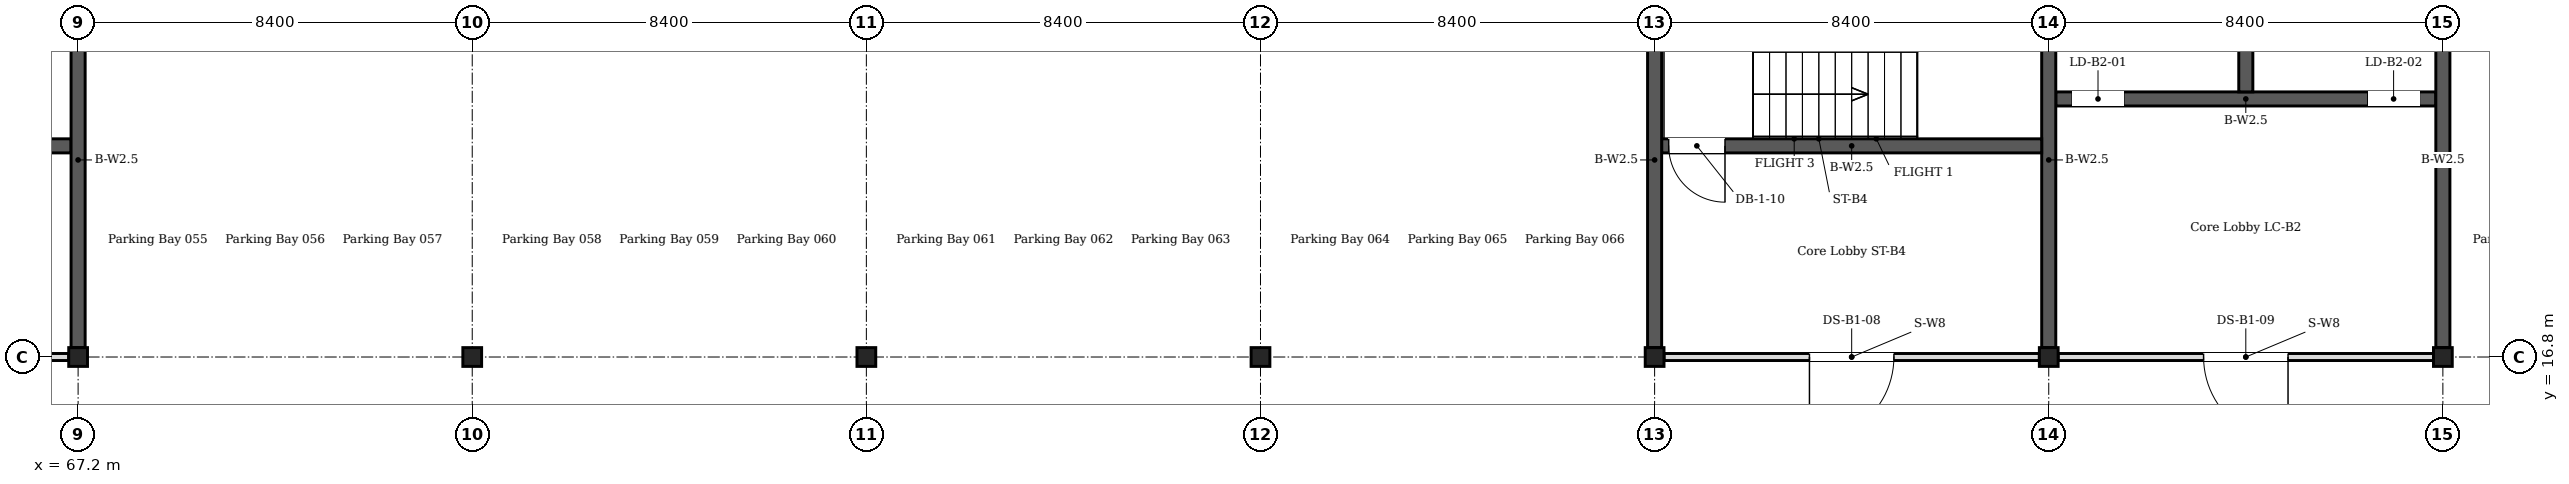
"""IFC4 building model, lengths in metres.
Left out: names, types, materials, properties, quantities, classifications, styles, units other than length and angle.
Written with IfcOpenShell. Run it as: python <this file> out.ifc"""

import sys

from ifc_helpers import new_model, si_unit, direction, frame, frame_2d, origin, origin_2d, place, context, subcontext, project, spatial, rectangle, i_section, extrude, element, fill, save


model = new_model("IFC4")
c1 = context("Model", 3, precision=1e-05, world=origin(), true_north=direction((0.0, 1.0)))
c2 = subcontext(c1, "Body", "Model", "MODEL_VIEW")
j1 = project(units=[si_unit("LENGTHUNIT", "METRE"), si_unit("PLANEANGLEUNIT", "RADIAN")], contexts=[c1])
p1 = place(None, origin())
s1 = spatial("IfcSite", under=j1, at=p1, CompositionType="ELEMENT")
p2 = place(p1, origin())
s2 = spatial("IfcBuilding", under=s1, at=p2, CompositionType="ELEMENT")
p3 = place(p2, frame((0.0, 0.0, -5.4)))
s3 = spatial("IfcBuildingStorey", under=s2, at=p3, CompositionType="ELEMENT", Elevation=-5.4)
for number, where, z_axis, x_axis in (
    (1, (67.2, 16.8, 0.0), (0.0, 0.0, 1.0), (1.0, 0.0, 0.0)),
    (2, (75.6, 16.8, 0.0), (0.0, 0.0, 1.0), (1.0, 0.0, 0.0)),
    (3, (84.0, 16.8, 0.0), (0.0, 0.0, 1.0), (1.0, 0.0, 0.0)),
    (4, (92.4, 16.8, 0.0), (0.0, 0.0, 1.0), (1.0, 0.0, 0.0)),
    (5, (100.8, 16.8, 0.0), (0.0, 0.0, 1.0), (1.0, 0.0, 0.0)),
    (6, (109.2, 16.8, 0.0), (0.0, 0.0, 1.0), (1.0, 0.0, 0.0)),
    (7, (117.6, 16.8, 0.0), (0.0, 0.0, 1.0), (1.0, 0.0, 0.0)),
):
    element("IfcColumn", number, at=place(p3, frame(where, z_axis=z_axis, x_axis=x_axis)), inside=s3, PredefinedType="COLUMN", context=c2, shape_type="SweptSolid", body=[
        extrude(i_section(OverallWidth=0.4, OverallDepth=0.4, WebThickness=0.013, FlangeThickness=0.021, FilletRadius=0.022, at=origin_2d()), origin(), (0.0, 0.0, 1.0), 5.4),
    ])
for number, where, z_axis, x_axis in (
    (8, (109.2, 17.0, 0.0), (0.0, 0.0, 1.0), (0.0, 1.0, 0.0)),
    (9, (117.6, 17.0, 0.0), (0.0, 0.0, 1.0), (0.0, 1.0, 0.0)),
):
    element("IfcWall", number, at=place(p3, frame(where, z_axis=z_axis, x_axis=x_axis)), inside=s3, PredefinedType="SHEAR", context=c2, shape_type="SweptSolid", body=[
        extrude(rectangle(XDim=8.0, YDim=0.3, at=frame_2d((4.0, 0.0))), origin(), (0.0, 0.0, 1.0), 4.95),
    ])
p4 = place(p3, frame((109.35, 22.3, 0.0), z_axis=(0.0, 0.0, 1.0), x_axis=(1.0, 0.0, 0.0)))
e10 = element("IfcWall", 10, at=p4, inside=s3, PredefinedType="SHEAR", context=c2, shape_type="SweptSolid", body=[
    extrude(rectangle(XDim=8.1, YDim=0.3, at=frame_2d((4.05, 0.0))), origin(), (0.0, 0.0, 1.0), 4.95),
])
p5 = place(p4, frame((0.35, 0.0, 0.0)))
e11 = element("IfcOpeningElement", 11, at=p5, cuts=e10, PredefinedType="OPENING", context=c2, shape_type="SweptSolid", body=[
    extrude(rectangle(XDim=1.1, YDim=2.2, at=frame_2d((0.55, 1.1))), frame((0.0, 0.16, 0.0), z_axis=(0.0, -1.0, 0.0), x_axis=(1.0, 0.0, 0.0)), (0.0, 0.0, 1.0), 0.32),
])
p6 = place(p4, frame((6.65, 0.0, 0.0)))
e12 = element("IfcOpeningElement", 12, at=p6, cuts=e10, PredefinedType="OPENING", context=c2, shape_type="SweptSolid", body=[
    extrude(rectangle(XDim=1.1, YDim=2.2, at=frame_2d((0.55, 1.1))), frame((0.0, 0.16, 0.0), z_axis=(0.0, -1.0, 0.0), x_axis=(1.0, 0.0, 0.0)), (0.0, 0.0, 1.0), 0.32),
])
p7 = place(p3, frame((113.4, 22.45, 0.0), z_axis=(0.0, 0.0, 1.0), x_axis=(0.0, 1.0, 0.0)))
e13 = element("IfcWall", 13, at=p7, inside=s3, PredefinedType="SHEAR", context=c2, shape_type="SweptSolid", body=[
    extrude(rectangle(XDim=2.95, YDim=0.3, at=frame_2d((1.475, 0.0))), origin(), (0.0, 0.0, 1.0), 4.95),
])
p8 = place(p3, frame((67.2, 17.0, 0.0), z_axis=(0.0, 0.0, 1.0), x_axis=(0.0, 1.0, 0.0)))
e14 = element("IfcWall", 14, at=p8, inside=s3, PredefinedType="SHEAR", context=c2, shape_type="SweptSolid", body=[
    extrude(rectangle(XDim=8.0, YDim=0.3, at=frame_2d((4.0, 0.0))), origin(), (0.0, 0.0, 1.0), 4.95),
])
p9 = place(p3, frame((58.95, 21.3, 0.0), z_axis=(0.0, 0.0, 1.0), x_axis=(1.0, 0.0, 0.0)))
e15 = element("IfcWall", 15, at=p9, inside=s3, PredefinedType="SHEAR", context=c2, shape_type="SweptSolid", body=[
    extrude(rectangle(XDim=8.1, YDim=0.3, at=frame_2d((4.05, 0.0))), origin(), (0.0, 0.0, 1.0), 4.95),
])
p10 = place(p9, frame((0.15, 0.0, 0.0)))
e16 = element("IfcOpeningElement", 16, at=p10, cuts=e15, PredefinedType="OPENING", context=c2, shape_type="SweptSolid", body=[
    extrude(rectangle(XDim=1.2, YDim=2.1, at=frame_2d((0.6, 1.05))), frame((0.0, 0.16, 0.0), z_axis=(0.0, -1.0, 0.0), x_axis=(1.0, 0.0, 0.0)), (0.0, 0.0, 1.0), 0.32),
])
p11 = place(p3, frame((100.8, 17.0, 0.0), z_axis=(0.0, 0.0, 1.0), x_axis=(0.0, 1.0, 0.0)))
e17 = element("IfcWall", 17, at=p11, inside=s3, PredefinedType="SHEAR", context=c2, shape_type="SweptSolid", body=[
    extrude(rectangle(XDim=8.0, YDim=0.3, at=frame_2d((4.0, 0.0))), origin(), (0.0, 0.0, 1.0), 4.95),
])
p12 = place(p3, frame((100.95, 21.3, 0.0), z_axis=(0.0, 0.0, 1.0), x_axis=(1.0, 0.0, 0.0)))
e18 = element("IfcWall", 18, at=p12, inside=s3, PredefinedType="SHEAR", context=c2, shape_type="SweptSolid", body=[
    extrude(rectangle(XDim=8.1, YDim=0.3, at=frame_2d((4.05, 0.0))), origin(), (0.0, 0.0, 1.0), 4.95),
])
p13 = place(p12, frame((0.15, 0.0, 0.0)))
e19 = element("IfcOpeningElement", 19, at=p13, cuts=e18, PredefinedType="OPENING", context=c2, shape_type="SweptSolid", body=[
    extrude(rectangle(XDim=1.2, YDim=2.1, at=frame_2d((0.6, 1.05))), frame((0.0, 0.16, 0.0), z_axis=(0.0, -1.0, 0.0), x_axis=(1.0, 0.0, 0.0)), (0.0, 0.0, 1.0), 0.32),
])
p14 = place(p3, frame((59.0, 16.8, 0.0), z_axis=(0.0, 0.0, 1.0), x_axis=(1.0, 0.0, 0.0)))
e20 = element("IfcWall", 20, at=p14, inside=s3, PredefinedType="PARTITIONING", context=c2, shape_type="SweptSolid", body=[
    extrude(rectangle(XDim=8.0, YDim=0.15, at=frame_2d((4.0, 0.0))), origin(), (0.0, 0.0, 1.0), 4.95),
])
p15 = place(p14, frame((3.1, 0.0, 0.0)))
e21 = element("IfcOpeningElement", 21, at=p15, cuts=e20, PredefinedType="OPENING", context=c2, shape_type="SweptSolid", body=[
    extrude(rectangle(XDim=1.8, YDim=2.1, at=frame_2d((0.9, 1.05))), frame((0.0, 0.085, 0.0), z_axis=(0.0, -1.0, 0.0), x_axis=(1.0, 0.0, 0.0)), (0.0, 0.0, 1.0), 0.17),
])
p16 = place(p3, frame((101.0, 16.8, 0.0), z_axis=(0.0, 0.0, 1.0), x_axis=(1.0, 0.0, 0.0)))
e22 = element("IfcWall", 22, at=p16, inside=s3, PredefinedType="PARTITIONING", context=c2, shape_type="SweptSolid", body=[
    extrude(rectangle(XDim=8.0, YDim=0.15, at=frame_2d((4.0, 0.0))), origin(), (0.0, 0.0, 1.0), 4.95),
])
p17 = place(p16, frame((3.1, 0.0, 0.0)))
e23 = element("IfcOpeningElement", 23, at=p17, cuts=e22, PredefinedType="OPENING", context=c2, shape_type="SweptSolid", body=[
    extrude(rectangle(XDim=1.8, YDim=2.1, at=frame_2d((0.9, 1.05))), frame((0.0, 0.085, 0.0), z_axis=(0.0, -1.0, 0.0), x_axis=(1.0, 0.0, 0.0)), (0.0, 0.0, 1.0), 0.17),
])
p18 = place(p3, frame((109.4, 16.8, 0.0), z_axis=(0.0, 0.0, 1.0), x_axis=(1.0, 0.0, 0.0)))
e24 = element("IfcWall", 24, at=p18, inside=s3, PredefinedType="PARTITIONING", context=c2, shape_type="SweptSolid", body=[
    extrude(rectangle(XDim=8.0, YDim=0.15, at=frame_2d((4.0, 0.0))), origin(), (0.0, 0.0, 1.0), 4.95),
])
p19 = place(p18, frame((3.1, 0.0, 0.0)))
e25 = element("IfcOpeningElement", 25, at=p19, cuts=e24, PredefinedType="OPENING", context=c2, shape_type="SweptSolid", body=[
    extrude(rectangle(XDim=1.8, YDim=2.1, at=frame_2d((0.9, 1.05))), frame((0.0, 0.085, 0.0), z_axis=(0.0, -1.0, 0.0), x_axis=(1.0, 0.0, 0.0)), (0.0, 0.0, 1.0), 0.17),
])
p20 = place(p17, origin())
e26 = element("IfcDoor", 26, at=p20, inside=s3, OperationType="DOUBLE_DOOR_SINGLE_SWING", PredefinedType="DOOR", context=c2, shape_type="SweptSolid", body=[
    extrude(rectangle(XDim=1.8, YDim=2.1, at=frame_2d((0.9, 1.05))), frame((0.0, 0.025, 0.0), z_axis=(0.0, -1.0, 0.0), x_axis=(1.0, 0.0, 0.0)), (0.0, 0.0, 1.0), 0.05),
])
fill(e23, e26)
p21 = place(p19, origin())
e27 = element("IfcDoor", 27, at=p21, inside=s3, OperationType="DOUBLE_DOOR_SINGLE_SWING", PredefinedType="DOOR", context=c2, shape_type="SweptSolid", body=[
    extrude(rectangle(XDim=1.8, YDim=2.1, at=frame_2d((0.9, 1.05))), frame((0.0, 0.025, 0.0), z_axis=(0.0, -1.0, 0.0), x_axis=(1.0, 0.0, 0.0)), (0.0, 0.0, 1.0), 0.05),
])
fill(e25, e27)
p22 = place(p5, origin())
e28 = element("IfcDoor", 28, at=p22, inside=s3, OperationType="SLIDING_TO_LEFT", PredefinedType="DOOR", context=c2, shape_type="SweptSolid", body=[
    extrude(rectangle(XDim=1.1, YDim=2.2, at=frame_2d((0.55, 1.1))), frame((0.0, 0.025, 0.0), z_axis=(0.0, -1.0, 0.0), x_axis=(1.0, 0.0, 0.0)), (0.0, 0.0, 1.0), 0.05),
])
fill(e11, e28)
p23 = place(p6, origin())
e29 = element("IfcDoor", 29, at=p23, inside=s3, OperationType="SLIDING_TO_LEFT", PredefinedType="DOOR", context=c2, shape_type="SweptSolid", body=[
    extrude(rectangle(XDim=1.1, YDim=2.2, at=frame_2d((0.55, 1.1))), frame((0.0, 0.025, 0.0), z_axis=(0.0, -1.0, 0.0), x_axis=(1.0, 0.0, 0.0)), (0.0, 0.0, 1.0), 0.05),
])
fill(e12, e29)
p24 = place(p13, origin())
e30 = element("IfcDoor", 30, at=p24, inside=s3, OperationType="SINGLE_SWING_LEFT", PredefinedType="DOOR", context=c2, shape_type="SweptSolid", body=[
    extrude(rectangle(XDim=1.2, YDim=2.1, at=frame_2d((0.6, 1.05))), frame((0.0, 0.025, 0.0), z_axis=(0.0, -1.0, 0.0), x_axis=(1.0, 0.0, 0.0)), (0.0, 0.0, 1.0), 0.05),
])
fill(e19, e30)
save(model, sys.argv[1])
